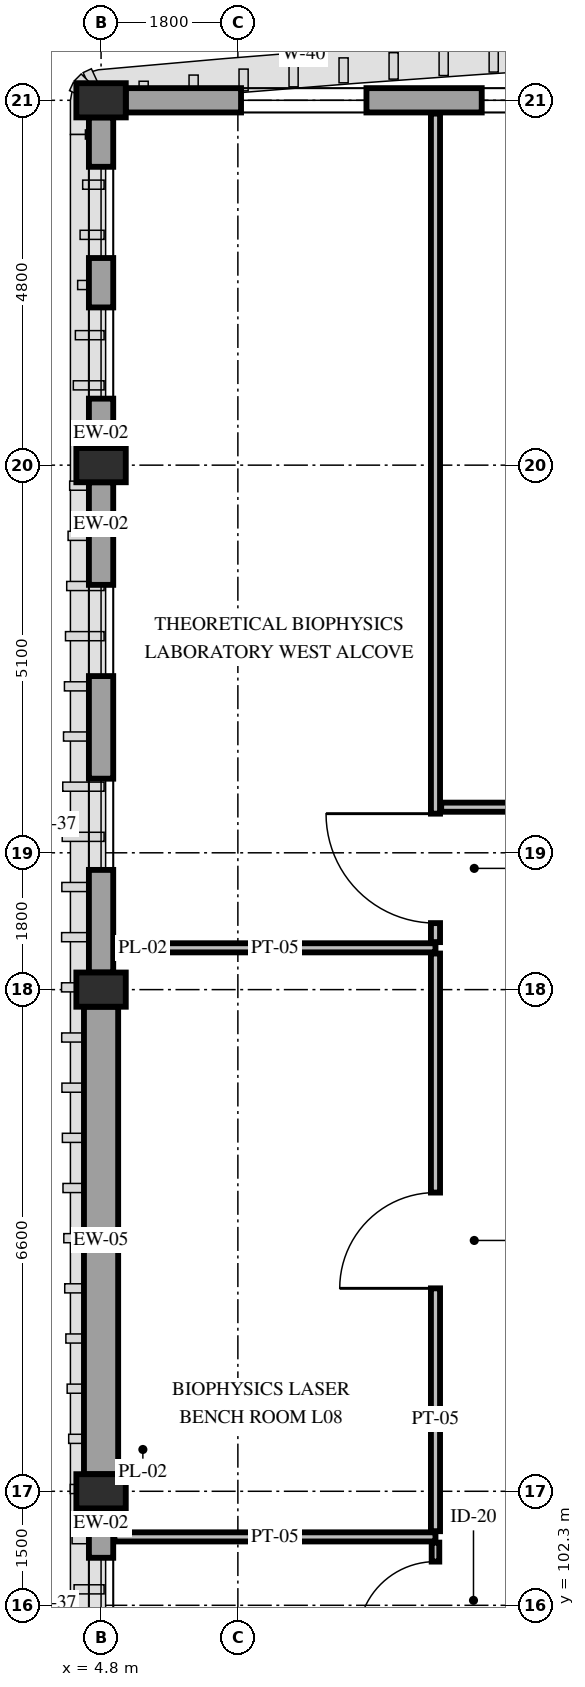
"""IFC4 building model, lengths in metres.
Left out: names, types, materials, properties, quantities, classifications, styles, units other than length and angle.
Written with IfcOpenShell. Run it as: python <this file> out.ifc"""

import sys

from ifc_helpers import new_model, si_unit, direction, frame, frame_2d, origin, origin_2d, place, context, subcontext, project, spatial, rectangle, extrude, element, fill, save


model = new_model("IFC4")
c1 = context("Model", 3, precision=1e-05, world=origin(), true_north=direction((0.0, 1.0)))
c2 = subcontext(c1, "Body", "Model", "MODEL_VIEW")
j1 = project(units=[si_unit("LENGTHUNIT", "METRE"), si_unit("PLANEANGLEUNIT", "RADIAN")], contexts=[c1])
p1 = place(None, origin())
s1 = spatial("IfcSite", under=j1, at=p1, CompositionType="ELEMENT")
p2 = place(p1, origin())
s2 = spatial("IfcBuilding", under=s1, at=p2, CompositionType="ELEMENT")
p3 = place(p2, frame((0.0, 0.0, 38.4)))
s3 = spatial("IfcBuildingStorey", under=s2, at=p3, CompositionType="ELEMENT", Elevation=38.4)
for number, where, z_axis, x_axis in (
    (1, (4.8, 103.8, 0.0), (0.0, 0.0, 1.0), (0.0, 1.0, 0.0)),
    (2, (4.8, 110.4, 0.0), (0.0, 0.0, 1.0), (0.0, 1.0, 0.0)),
    (3, (4.8, 117.3, 0.0), (0.0, 0.0, 1.0), (0.0, 1.0, 0.0)),
    (4, (4.8, 122.1, 0.0), (0.0, 0.0, 1.0), (0.0, 1.0, 0.0)),
):
    element("IfcColumn", number, at=place(p3, frame(where, z_axis=z_axis, x_axis=x_axis)), inside=s3, PredefinedType="PILASTER", context=c2, shape_type="SweptSolid", body=[
        extrude(rectangle(XDim=0.45, YDim=0.65, at=origin_2d()), origin(), (0.0, 0.0, 1.0), 4.2),
    ])
p4 = place(p3, frame((4.8, 99.225, 0.0), z_axis=(0.0, 0.0, 1.0), x_axis=(0.0, 1.0, 0.0)))
e5 = element("IfcWall", 5, at=p4, inside=s3, PredefinedType="STANDARD", context=c2, shape_type="SweptSolid", body=[
    extrude(rectangle(XDim=4.35, YDim=0.32, at=frame_2d((2.175, 0.0))), origin(), (0.0, 0.0, 1.0), 3.23),
])
p5 = place(p4, frame((0.65, 0.0, 0.85)))
e6 = element("IfcOpeningElement", 6, at=p5, cuts=e5, PredefinedType="OPENING", context=c2, shape_type="SweptSolid", body=[
    extrude(rectangle(XDim=1.2, YDim=2.08, at=frame_2d((0.6, 1.04))), frame((0.0, 0.175, 0.0), z_axis=(0.0, -1.0, 0.0), x_axis=(1.0, 0.0, 0.0)), (0.0, 0.0, 1.0), 0.35),
])
p6 = place(p4, frame((2.5, 0.0, 0.85)))
e7 = element("IfcOpeningElement", 7, at=p6, cuts=e5, PredefinedType="OPENING", context=c2, shape_type="SweptSolid", body=[
    extrude(rectangle(XDim=1.2, YDim=2.08, at=frame_2d((0.6, 1.04))), frame((0.0, 0.175, 0.0), z_axis=(0.0, -1.0, 0.0), x_axis=(1.0, 0.0, 0.0)), (0.0, 0.0, 1.0), 0.35),
])
p7 = place(p3, frame((4.8, 104.025, 0.0), z_axis=(0.0, 0.0, 1.0), x_axis=(0.0, 1.0, 0.0)))
e8 = element("IfcWall", 8, at=p7, inside=s3, PredefinedType="SOLIDWALL", context=c2, shape_type="SweptSolid", body=[
    extrude(rectangle(XDim=6.15, YDim=0.45, at=frame_2d((3.075, 0.0))), origin(), (0.0, 0.0, 1.0), 3.23),
])
p8 = place(p3, frame((4.8, 110.625, 0.0), z_axis=(0.0, 0.0, 1.0), x_axis=(0.0, 1.0, 0.0)))
e9 = element("IfcWall", 9, at=p8, inside=s3, PredefinedType="STANDARD", context=c2, shape_type="SweptSolid", body=[
    extrude(rectangle(XDim=6.45, YDim=0.32, at=frame_2d((3.225, 0.0))), origin(), (0.0, 0.0, 1.0), 3.23),
])
p9 = place(p8, frame((1.35, 0.0, 0.85)))
e10 = element("IfcOpeningElement", 10, at=p9, cuts=e9, PredefinedType="OPENING", context=c2, shape_type="SweptSolid", body=[
    extrude(rectangle(XDim=1.2, YDim=2.08, at=frame_2d((0.6, 1.04))), frame((0.0, 0.175, 0.0), z_axis=(0.0, -1.0, 0.0), x_axis=(1.0, 0.0, 0.0)), (0.0, 0.0, 1.0), 0.35),
])
p10 = place(p8, frame((3.9, 0.0, 0.85)))
e11 = element("IfcOpeningElement", 11, at=p10, cuts=e9, PredefinedType="OPENING", context=c2, shape_type="SweptSolid", body=[
    extrude(rectangle(XDim=1.2, YDim=2.08, at=frame_2d((0.6, 1.04))), frame((0.0, 0.175, 0.0), z_axis=(0.0, -1.0, 0.0), x_axis=(1.0, 0.0, 0.0)), (0.0, 0.0, 1.0), 0.35),
])
p11 = place(p3, frame((4.8, 117.525, 0.0), z_axis=(0.0, 0.0, 1.0), x_axis=(0.0, 1.0, 0.0)))
e12 = element("IfcWall", 12, at=p11, inside=s3, PredefinedType="STANDARD", context=c2, shape_type="SweptSolid", body=[
    extrude(rectangle(XDim=4.35, YDim=0.32, at=frame_2d((2.175, 0.0))), origin(), (0.0, 0.0, 1.0), 3.23),
])
p12 = place(p11, frame((0.65, 0.0, 0.85)))
e13 = element("IfcOpeningElement", 13, at=p12, cuts=e12, PredefinedType="OPENING", context=c2, shape_type="SweptSolid", body=[
    extrude(rectangle(XDim=1.2, YDim=2.08, at=frame_2d((0.6, 1.04))), frame((0.0, 0.175, 0.0), z_axis=(0.0, -1.0, 0.0), x_axis=(1.0, 0.0, 0.0)), (0.0, 0.0, 1.0), 0.35),
])
p13 = place(p11, frame((2.5, 0.0, 0.85)))
e14 = element("IfcOpeningElement", 14, at=p13, cuts=e12, PredefinedType="OPENING", context=c2, shape_type="SweptSolid", body=[
    extrude(rectangle(XDim=1.2, YDim=2.08, at=frame_2d((0.6, 1.04))), frame((0.0, 0.175, 0.0), z_axis=(0.0, -1.0, 0.0), x_axis=(1.0, 0.0, 0.0)), (0.0, 0.0, 1.0), 0.35),
])
p14 = place(p3, frame((5.125, 122.1, 0.0), z_axis=(0.0, 0.0, 1.0), x_axis=(1.0, 0.0, 0.0)))
e15 = element("IfcWall", 15, at=p14, inside=s3, PredefinedType="STANDARD", context=c2, shape_type="SweptSolid", body=[
    extrude(rectangle(XDim=7.85, YDim=0.32, at=frame_2d((3.925, 0.0))), origin(), (0.0, 0.0, 1.0), 3.33),
])
p15 = place(p14, frame((1.517, 0.0, 0.85)))
e16 = element("IfcOpeningElement", 16, at=p15, cuts=e15, PredefinedType="OPENING", context=c2, shape_type="SweptSolid", body=[
    extrude(rectangle(XDim=1.65, YDim=2.08, at=frame_2d((0.825, 1.04))), frame((0.0, 0.175, 0.0), z_axis=(0.0, -1.0, 0.0), x_axis=(1.0, 0.0, 0.0)), (0.0, 0.0, 1.0), 0.35),
])
p16 = place(p14, frame((4.683, 0.0, 0.85)))
e17 = element("IfcOpeningElement", 17, at=p16, cuts=e15, PredefinedType="OPENING", context=c2, shape_type="SweptSolid", body=[
    extrude(rectangle(XDim=1.65, YDim=2.08, at=frame_2d((0.825, 1.04))), frame((0.0, 0.175, 0.0), z_axis=(0.0, -1.0, 0.0), x_axis=(1.0, 0.0, 0.0)), (0.0, 0.0, 1.0), 0.35),
])
for number, where, z_axis, x_axis in (
    (18, (4.975, 103.2, 0.0), (0.0, 0.0, 1.0), (1.0, 0.0, 0.0)),
    (19, (4.975, 110.95, 0.0), (0.0, 0.0, 1.0), (1.0, 0.0, 0.0)),
):
    element("IfcWall", number, at=place(p3, frame(where, z_axis=z_axis, x_axis=x_axis)), inside=s3, PredefinedType="PARTITIONING", context=c2, shape_type="SweptSolid", body=[
        extrude(rectangle(XDim=4.225, YDim=0.12, at=frame_2d((2.112, 0.0))), origin(), (0.0, 0.0, 1.0), 3.48),
    ])
p17 = place(p3, frame((9.2, 103.275, 0.0), z_axis=(0.0, 0.0, 1.0), x_axis=(0.0, 1.0, 0.0)))
e20 = element("IfcWall", 20, at=p17, inside=s3, PredefinedType="PARTITIONING", context=c2, shape_type="SweptSolid", body=[
    extrude(rectangle(XDim=7.6, YDim=0.12, at=frame_2d((3.8, 0.0))), origin(), (0.0, 0.0, 1.0), 3.23),
])
p18 = place(p17, frame((3.195, 0.0, 0.0)))
e21 = element("IfcOpeningElement", 21, at=p18, cuts=e20, PredefinedType="OPENING", context=c2, shape_type="SweptSolid", body=[
    extrude(rectangle(XDim=1.26, YDim=2.2, at=frame_2d((0.63, 1.1))), frame((0.0, 0.075, 0.0), z_axis=(0.0, -1.0, 0.0), x_axis=(1.0, 0.0, 0.0)), (0.0, 0.0, 1.0), 0.15),
])
p19 = place(p3, frame((9.2, 111.025, 0.0), z_axis=(0.0, 0.0, 1.0), x_axis=(0.0, 1.0, 0.0)))
e22 = element("IfcWall", 22, at=p19, inside=s3, PredefinedType="PARTITIONING", context=c2, shape_type="SweptSolid", body=[
    extrude(rectangle(XDim=10.9, YDim=0.12, at=frame_2d((5.45, 0.0))), origin(), (0.0, 0.0, 1.0), 3.23),
])
p20 = place(p19, frame((0.25, 0.0, 0.0)))
e23 = element("IfcOpeningElement", 23, at=p20, cuts=e22, PredefinedType="OPENING", context=c2, shape_type="SweptSolid", body=[
    extrude(rectangle(XDim=1.44, YDim=2.25, at=frame_2d((0.72, 1.125))), frame((0.0, 0.075, 0.0), z_axis=(0.0, -1.0, 0.0), x_axis=(1.0, 0.0, 0.0)), (0.0, 0.0, 1.0), 0.15),
])
p21 = place(p3, frame((9.275, 112.8, 0.0), z_axis=(0.0, 0.0, 1.0), x_axis=(1.0, 0.0, 0.0)))
e24 = element("IfcWall", 24, at=p21, inside=s3, PredefinedType="PARTITIONING", context=c2, shape_type="SweptSolid", body=[
    extrude(rectangle(XDim=8.925, YDim=0.12, at=frame_2d((4.462, 0.0))), origin(), (0.0, 0.0, 1.0), 3.53),
])
p22 = place(p21, frame((4.785, 0.0, 0.0)))
e25 = element("IfcOpeningElement", 25, at=p22, cuts=e24, PredefinedType="OPENING", context=c2, shape_type="SweptSolid", body=[
    extrude(rectangle(XDim=1.38, YDim=2.25, at=frame_2d((0.69, 1.125))), frame((0.0, 0.075, 0.0), z_axis=(0.0, -1.0, 0.0), x_axis=(1.0, 0.0, 0.0)), (0.0, 0.0, 1.0), 0.15),
])
p23 = place(p3, frame((9.2, 99.04, 0.0), z_axis=(0.0, 0.0, 1.0), x_axis=(0.0, 1.0, 0.0)))
e26 = element("IfcWall", 26, at=p23, inside=s3, PredefinedType="PARTITIONING", context=c2, shape_type="SweptSolid", body=[
    extrude(rectangle(XDim=4.085, YDim=0.1, at=frame_2d((2.042, 0.0))), origin(), (0.0, 0.0, 1.0), 3.33),
])
p24 = place(p23, frame((2.815, 0.0, 0.0)))
e27 = element("IfcOpeningElement", 27, at=p24, cuts=e26, PredefinedType="OPENING", context=c2, shape_type="SweptSolid", body=[
    extrude(rectangle(XDim=1.02, YDim=2.2, at=frame_2d((0.51, 1.1))), frame((0.0, 0.065, 0.0), z_axis=(0.0, -1.0, 0.0), x_axis=(1.0, 0.0, 0.0)), (0.0, 0.0, 1.0), 0.13),
])
p25 = place(p6, origin())
e28 = element("IfcWindow", 28, at=p25, inside=s3, PartitioningType="SINGLE_PANEL", PredefinedType="WINDOW", context=c2, shape_type="SweptSolid", body=[
    extrude(rectangle(XDim=1.2, YDim=2.08, at=frame_2d((0.6, 1.04))), frame((0.0, 0.03, 0.0), z_axis=(0.0, -1.0, 0.0), x_axis=(1.0, 0.0, 0.0)), (0.0, 0.0, 1.0), 0.06),
])
fill(e7, e28)
p26 = place(p9, origin())
e29 = element("IfcWindow", 29, at=p26, inside=s3, PartitioningType="SINGLE_PANEL", PredefinedType="WINDOW", context=c2, shape_type="SweptSolid", body=[
    extrude(rectangle(XDim=1.2, YDim=2.08, at=frame_2d((0.6, 1.04))), frame((0.0, 0.03, 0.0), z_axis=(0.0, -1.0, 0.0), x_axis=(1.0, 0.0, 0.0)), (0.0, 0.0, 1.0), 0.06),
])
fill(e10, e29)
p27 = place(p10, origin())
e30 = element("IfcWindow", 30, at=p27, inside=s3, PartitioningType="SINGLE_PANEL", PredefinedType="WINDOW", context=c2, shape_type="SweptSolid", body=[
    extrude(rectangle(XDim=1.2, YDim=2.08, at=frame_2d((0.6, 1.04))), frame((0.0, 0.03, 0.0), z_axis=(0.0, -1.0, 0.0), x_axis=(1.0, 0.0, 0.0)), (0.0, 0.0, 1.0), 0.06),
])
fill(e11, e30)
p28 = place(p12, origin())
e31 = element("IfcWindow", 31, at=p28, inside=s3, PartitioningType="SINGLE_PANEL", PredefinedType="WINDOW", context=c2, shape_type="SweptSolid", body=[
    extrude(rectangle(XDim=1.2, YDim=2.08, at=frame_2d((0.6, 1.04))), frame((0.0, 0.03, 0.0), z_axis=(0.0, -1.0, 0.0), x_axis=(1.0, 0.0, 0.0)), (0.0, 0.0, 1.0), 0.06),
])
fill(e13, e31)
p29 = place(p13, origin())
e32 = element("IfcWindow", 32, at=p29, inside=s3, PartitioningType="SINGLE_PANEL", PredefinedType="WINDOW", context=c2, shape_type="SweptSolid", body=[
    extrude(rectangle(XDim=1.2, YDim=2.08, at=frame_2d((0.6, 1.04))), frame((0.0, 0.03, 0.0), z_axis=(0.0, -1.0, 0.0), x_axis=(1.0, 0.0, 0.0)), (0.0, 0.0, 1.0), 0.06),
])
fill(e14, e32)
p30 = place(p15, origin())
e33 = element("IfcWindow", 33, at=p30, inside=s3, PartitioningType="SINGLE_PANEL", PredefinedType="WINDOW", context=c2, shape_type="SweptSolid", body=[
    extrude(rectangle(XDim=1.65, YDim=2.08, at=frame_2d((0.825, 1.04))), frame((0.0, 0.03, 0.0), z_axis=(0.0, -1.0, 0.0), x_axis=(1.0, 0.0, 0.0)), (0.0, 0.0, 1.0), 0.06),
])
fill(e16, e33)
p31 = place(p16, origin())
e34 = element("IfcWindow", 34, at=p31, inside=s3, PartitioningType="SINGLE_PANEL", PredefinedType="WINDOW", context=c2, shape_type="SweptSolid", body=[
    extrude(rectangle(XDim=1.65, YDim=2.08, at=frame_2d((0.825, 1.04))), frame((0.0, 0.03, 0.0), z_axis=(0.0, -1.0, 0.0), x_axis=(1.0, 0.0, 0.0)), (0.0, 0.0, 1.0), 0.06),
])
fill(e17, e34)
p32 = place(p18, origin())
e35 = element("IfcDoor", 35, at=p32, inside=s3, OperationType="SINGLE_SWING_LEFT", PredefinedType="DOOR", context=c2, shape_type="SweptSolid", body=[
    extrude(rectangle(XDim=1.26, YDim=2.2, at=frame_2d((0.63, 1.1))), frame((0.0, 0.025, 0.0), z_axis=(0.0, -1.0, 0.0), x_axis=(1.0, 0.0, 0.0)), (0.0, 0.0, 1.0), 0.05),
])
fill(e21, e35)
p33 = place(p20, origin())
e36 = element("IfcDoor", 36, at=p33, inside=s3, OperationType="SINGLE_SWING_RIGHT", PredefinedType="DOOR", context=c2, shape_type="SweptSolid", body=[
    extrude(rectangle(XDim=1.44, YDim=2.25, at=frame_2d((0.72, 1.125))), frame((0.0, 0.025, 0.0), z_axis=(0.0, -1.0, 0.0), x_axis=(1.0, 0.0, 0.0)), (0.0, 0.0, 1.0), 0.05),
])
fill(e23, e36)
p34 = place(p24, origin())
e37 = element("IfcDoor", 37, at=p34, inside=s3, OperationType="SINGLE_SWING_LEFT", PredefinedType="DOOR", context=c2, shape_type="SweptSolid", body=[
    extrude(rectangle(XDim=1.02, YDim=2.2, at=frame_2d((0.51, 1.1))), frame((0.0, 0.025, 0.0), z_axis=(0.0, -1.0, 0.0), x_axis=(1.0, 0.0, 0.0)), (0.0, 0.0, 1.0), 0.05),
])
fill(e27, e37)
save(model, sys.argv[1])
